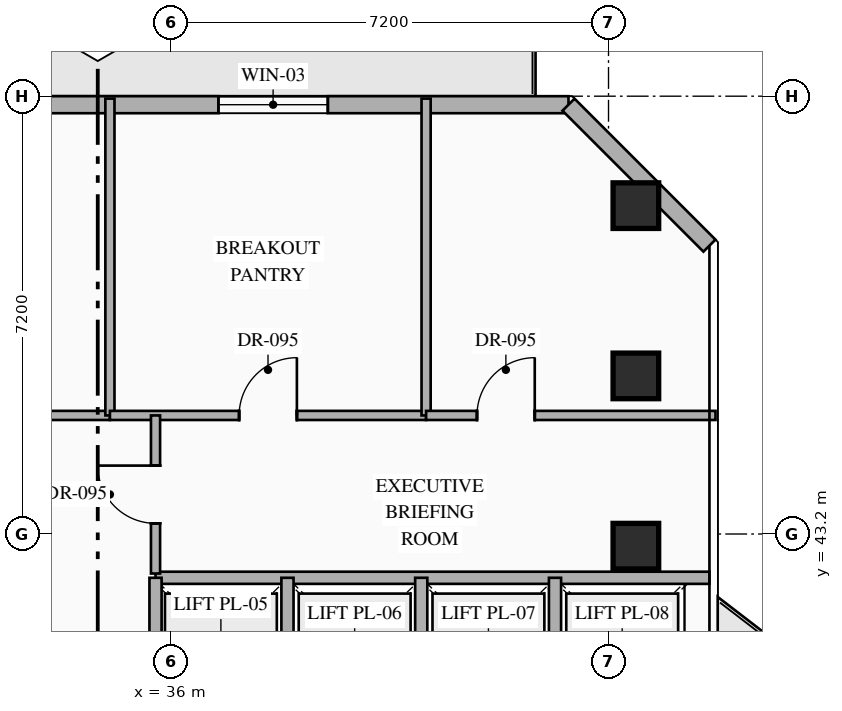
"""IFC4 building model, lengths in metres.
Left out: names, types, materials, properties, quantities, classifications, styles, units other than length and angle.
Written with IfcOpenShell. Run it as: python <this file> out.ifc"""

import sys

from ifc_helpers import new_model, si_unit, direction, frame, frame_2d, origin, origin_2d, place, context, subcontext, project, spatial, rectangle, hollow_rectangle, extrude, element, fill, save


model = new_model("IFC4")
c1 = context("Model", 3, precision=1e-05, world=origin(), true_north=direction((0.0, 1.0)))
c2 = subcontext(c1, "Body", "Model", "MODEL_VIEW")
j1 = project(units=[si_unit("LENGTHUNIT", "METRE"), si_unit("PLANEANGLEUNIT", "RADIAN")], contexts=[c1])
p1 = place(None, origin())
s1 = spatial("IfcSite", under=j1, at=p1, CompositionType="ELEMENT")
p2 = place(p1, origin())
s2 = spatial("IfcBuilding", under=s1, at=p2, CompositionType="ELEMENT")
p3 = place(p2, frame((0.0, 0.0, 195.15)))
s3 = spatial("IfcBuildingStorey", under=s2, at=p3, CompositionType="ELEMENT", Elevation=195.15)
for number, where, z_axis, x_axis in (
    (1, (43.65, 43.0, 0.0), (0.0, 0.0, 1.0), (1.0, 0.0, 0.0)),
    (2, (43.65, 45.8, 0.0), (0.0, 0.0, 1.0), (1.0, 0.0, 0.0)),
    (3, (43.65, 48.6, 0.0), (0.0, 0.0, 1.0), (1.0, 0.0, 0.0)),
):
    element("IfcColumn", number, at=place(p3, frame(where, z_axis=z_axis, x_axis=x_axis)), inside=s3, PredefinedType="COLUMN", context=c2, shape_type="SweptSolid", body=[
        extrude(hollow_rectangle(XDim=0.75, YDim=0.75, WallThickness=0.028, at=origin_2d()), origin(), (0.0, 0.0, 1.0), 3.6),
    ])
p4 = place(p3, frame((20.458, 50.26, 0.0), z_axis=(0.0, 0.0, 1.0), x_axis=(1.0, 0.0, 0.0)))
e4 = element("IfcWall", 4, at=p4, inside=s3, PredefinedType="STANDARD", context=c2, shape_type="SweptSolid", body=[
    extrude(rectangle(XDim=22.084, YDim=0.28, at=frame_2d((11.042, 0.0))), origin(), (0.0, 0.0, 1.0), 3.35),
])
p5 = place(p4, frame((2.1, 0.0, 0.0)))
e5 = element("IfcOpeningElement", 5, at=p5, cuts=e4, PredefinedType="OPENING", context=c2, shape_type="SweptSolid", body=[
    extrude(rectangle(XDim=1.1, YDim=2.2, at=frame_2d((0.55, 1.1))), frame((0.0, 0.15, 0.0), z_axis=(0.0, -1.0, 0.0), x_axis=(1.0, 0.0, 0.0)), (0.0, 0.0, 1.0), 0.3),
])
p6 = place(p4, frame((16.326, 0.0, 0.85)))
e6 = element("IfcOpeningElement", 6, at=p6, cuts=e4, PredefinedType="OPENING", context=c2, shape_type="SweptSolid", body=[
    extrude(rectangle(XDim=1.8, YDim=2.1, at=frame_2d((0.9, 1.05))), frame((0.0, 0.15, 0.0), z_axis=(0.0, -1.0, 0.0), x_axis=(1.0, 0.0, 0.0)), (0.0, 0.0, 1.0), 0.3),
])
p7 = place(p3, frame((42.542, 50.26, 0.0), z_axis=(0.0, 0.0, 1.0), x_axis=(0.707106781187, -0.707106781187, 0.0)))
e7 = element("IfcWall", 7, at=p7, inside=s3, PredefinedType="STANDARD", context=c2, shape_type="SweptSolid", body=[
    extrude(rectangle(XDim=3.278, YDim=0.28, at=frame_2d((1.639, 0.0))), origin(), (0.0, 0.0, 1.0), 3.35),
])
p8 = place(p3, frame((35.75, 42.48, 0.0), z_axis=(0.0, 0.0, 1.0), x_axis=(1.0, 0.0, 0.0)))
e8 = element("IfcWall", 8, at=p8, inside=s3, PredefinedType="STANDARD", context=c2, shape_type="SweptSolid", body=[
    extrude(rectangle(XDim=9.11, YDim=0.2, at=frame_2d((4.555, 0.0))), origin(), (0.0, 0.0, 1.0), 3.35),
])
for number, where, z_axis, x_axis in (
    (9, (35.75, 40.32, 0.0), (0.0, 0.0, 1.0), (0.0, 1.0, 0.0)),
    (10, (37.92, 40.32, 0.0), (0.0, 0.0, 1.0), (0.0, 1.0, 0.0)),
    (11, (40.12, 40.32, 0.0), (0.0, 0.0, 1.0), (0.0, 1.0, 0.0)),
    (12, (42.32, 40.32, 0.0), (0.0, 0.0, 1.0), (0.0, 1.0, 0.0)),
):
    element("IfcWall", number, at=place(p3, frame(where, z_axis=z_axis, x_axis=x_axis)), inside=s3, PredefinedType="STANDARD", context=c2, shape_type="SweptSolid", body=[
        extrude(rectangle(XDim=2.16, YDim=0.2, at=frame_2d((1.08, 0.0))), origin(), (0.0, 0.0, 1.0), 3.35),
    ])
p9 = place(p3, frame((29.6, 45.15, 0.0), z_axis=(0.0, 0.0, 1.0), x_axis=(1.0, 0.0, 0.0)))
e13 = element("IfcWall", 13, at=p9, inside=s3, PredefinedType="PARTITIONING", context=c2, shape_type="SweptSolid", body=[
    extrude(rectangle(XDim=5.4, YDim=0.15, at=frame_2d((2.7, 0.0))), origin(), (0.0, 0.0, 1.0), 3.35),
])
p10 = place(p9, frame((1.118, 0.0, 0.0)))
e14 = element("IfcOpeningElement", 14, at=p10, cuts=e13, PredefinedType="OPENING", context=c2, shape_type="SweptSolid", body=[
    extrude(rectangle(XDim=0.95, YDim=2.15, at=frame_2d((0.475, 1.075))), frame((0.0, 0.085, 0.0), z_axis=(0.0, -1.0, 0.0), x_axis=(1.0, 0.0, 0.0)), (0.0, 0.0, 1.0), 0.17),
])
p11 = place(p3, frame((35.0, 45.15, 0.0), z_axis=(0.0, 0.0, 1.0), x_axis=(0.0, 1.0, 0.0)))
e15 = element("IfcWall", 15, at=p11, inside=s3, PredefinedType="PARTITIONING", context=c2, shape_type="SweptSolid", body=[
    extrude(rectangle(XDim=5.21, YDim=0.15, at=frame_2d((2.605, 0.0))), origin(), (0.0, 0.0, 1.0), 3.35),
])
p12 = place(p3, frame((35.0, 45.15, 0.0), z_axis=(0.0, 0.0, 1.0), x_axis=(1.0, 0.0, 0.0)))
e16 = element("IfcWall", 16, at=p12, inside=s3, PredefinedType="PARTITIONING", context=c2, shape_type="SweptSolid", body=[
    extrude(rectangle(XDim=5.2, YDim=0.15, at=frame_2d((2.6, 0.0))), origin(), (0.0, 0.0, 1.0), 3.35),
])
p13 = place(p12, frame((2.125, 0.0, 0.0)))
e17 = element("IfcOpeningElement", 17, at=p13, cuts=e16, PredefinedType="OPENING", context=c2, shape_type="SweptSolid", body=[
    extrude(rectangle(XDim=0.95, YDim=2.15, at=frame_2d((0.475, 1.075))), frame((0.0, 0.085, 0.0), z_axis=(0.0, -1.0, 0.0), x_axis=(1.0, 0.0, 0.0)), (0.0, 0.0, 1.0), 0.17),
])
p14 = place(p3, frame((40.2, 45.15, 0.0), z_axis=(0.0, 0.0, 1.0), x_axis=(0.0, 1.0, 0.0)))
e18 = element("IfcWall", 18, at=p14, inside=s3, PredefinedType="PARTITIONING", context=c2, shape_type="SweptSolid", body=[
    extrude(rectangle(XDim=5.21, YDim=0.15, at=frame_2d((2.605, 0.0))), origin(), (0.0, 0.0, 1.0), 3.35),
])
p15 = place(p3, frame((40.2, 45.15, 0.0), z_axis=(0.0, 0.0, 1.0), x_axis=(1.0, 0.0, 0.0)))
e19 = element("IfcWall", 19, at=p15, inside=s3, PredefinedType="PARTITIONING", context=c2, shape_type="SweptSolid", body=[
    extrude(rectangle(XDim=4.76, YDim=0.15, at=frame_2d((2.38, 0.0))), origin(), (0.0, 0.0, 1.0), 3.35),
])
p16 = place(p15, frame((0.837, 0.0, 0.0)))
e20 = element("IfcOpeningElement", 20, at=p16, cuts=e19, PredefinedType="OPENING", context=c2, shape_type="SweptSolid", body=[
    extrude(rectangle(XDim=0.95, YDim=2.15, at=frame_2d((0.475, 1.075))), frame((0.0, 0.085, 0.0), z_axis=(0.0, -1.0, 0.0), x_axis=(1.0, 0.0, 0.0)), (0.0, 0.0, 1.0), 0.17),
])
p17 = place(p3, frame((35.75, 42.55, 0.0), z_axis=(0.0, 0.0, 1.0), x_axis=(0.0, 1.0, 0.0)))
e21 = element("IfcWall", 21, at=p17, inside=s3, PredefinedType="PARTITIONING", context=c2, shape_type="SweptSolid", body=[
    extrude(rectangle(XDim=2.6, YDim=0.15, at=frame_2d((1.3, 0.0))), origin(), (0.0, 0.0, 1.0), 3.35),
])
p18 = place(p17, frame((0.825, 0.0, 0.0)))
e22 = element("IfcOpeningElement", 22, at=p18, cuts=e21, PredefinedType="OPENING", context=c2, shape_type="SweptSolid", body=[
    extrude(rectangle(XDim=0.95, YDim=2.15, at=frame_2d((0.475, 1.075))), frame((0.0, 0.085, 0.0), z_axis=(0.0, -1.0, 0.0), x_axis=(1.0, 0.0, 0.0)), (0.0, 0.0, 1.0), 0.17),
])
p19 = place(p6, origin())
e23 = element("IfcWindow", 23, at=p19, inside=s3, PartitioningType="SINGLE_PANEL", PredefinedType="WINDOW", context=c2, shape_type="SweptSolid", body=[
    extrude(rectangle(XDim=1.8, YDim=2.1, at=frame_2d((0.9, 1.05))), frame((0.0, 0.03, 0.0), z_axis=(0.0, -1.0, 0.0), x_axis=(1.0, 0.0, 0.0)), (0.0, 0.0, 1.0), 0.06),
])
fill(e6, e23)
p20 = place(p13, origin())
e24 = element("IfcDoor", 24, at=p20, inside=s3, OperationType="SINGLE_SWING_RIGHT", PredefinedType="DOOR", context=c2, shape_type="SweptSolid", body=[
    extrude(rectangle(XDim=0.95, YDim=2.15, at=frame_2d((0.475, 1.075))), frame((0.0, 0.025, 0.0), z_axis=(0.0, -1.0, 0.0), x_axis=(1.0, 0.0, 0.0)), (0.0, 0.0, 1.0), 0.05),
])
fill(e17, e24)
p21 = place(p16, origin())
e25 = element("IfcDoor", 25, at=p21, inside=s3, OperationType="SINGLE_SWING_RIGHT", PredefinedType="DOOR", context=c2, shape_type="SweptSolid", body=[
    extrude(rectangle(XDim=0.95, YDim=2.15, at=frame_2d((0.475, 1.075))), frame((0.0, 0.025, 0.0), z_axis=(0.0, -1.0, 0.0), x_axis=(1.0, 0.0, 0.0)), (0.0, 0.0, 1.0), 0.05),
])
fill(e20, e25)
p22 = place(p18, origin())
e26 = element("IfcDoor", 26, at=p22, inside=s3, OperationType="SINGLE_SWING_RIGHT", PredefinedType="DOOR", context=c2, shape_type="SweptSolid", body=[
    extrude(rectangle(XDim=0.95, YDim=2.15, at=frame_2d((0.475, 1.075))), frame((0.0, 0.025, 0.0), z_axis=(0.0, -1.0, 0.0), x_axis=(1.0, 0.0, 0.0)), (0.0, 0.0, 1.0), 0.05),
])
fill(e22, e26)
save(model, sys.argv[1])
